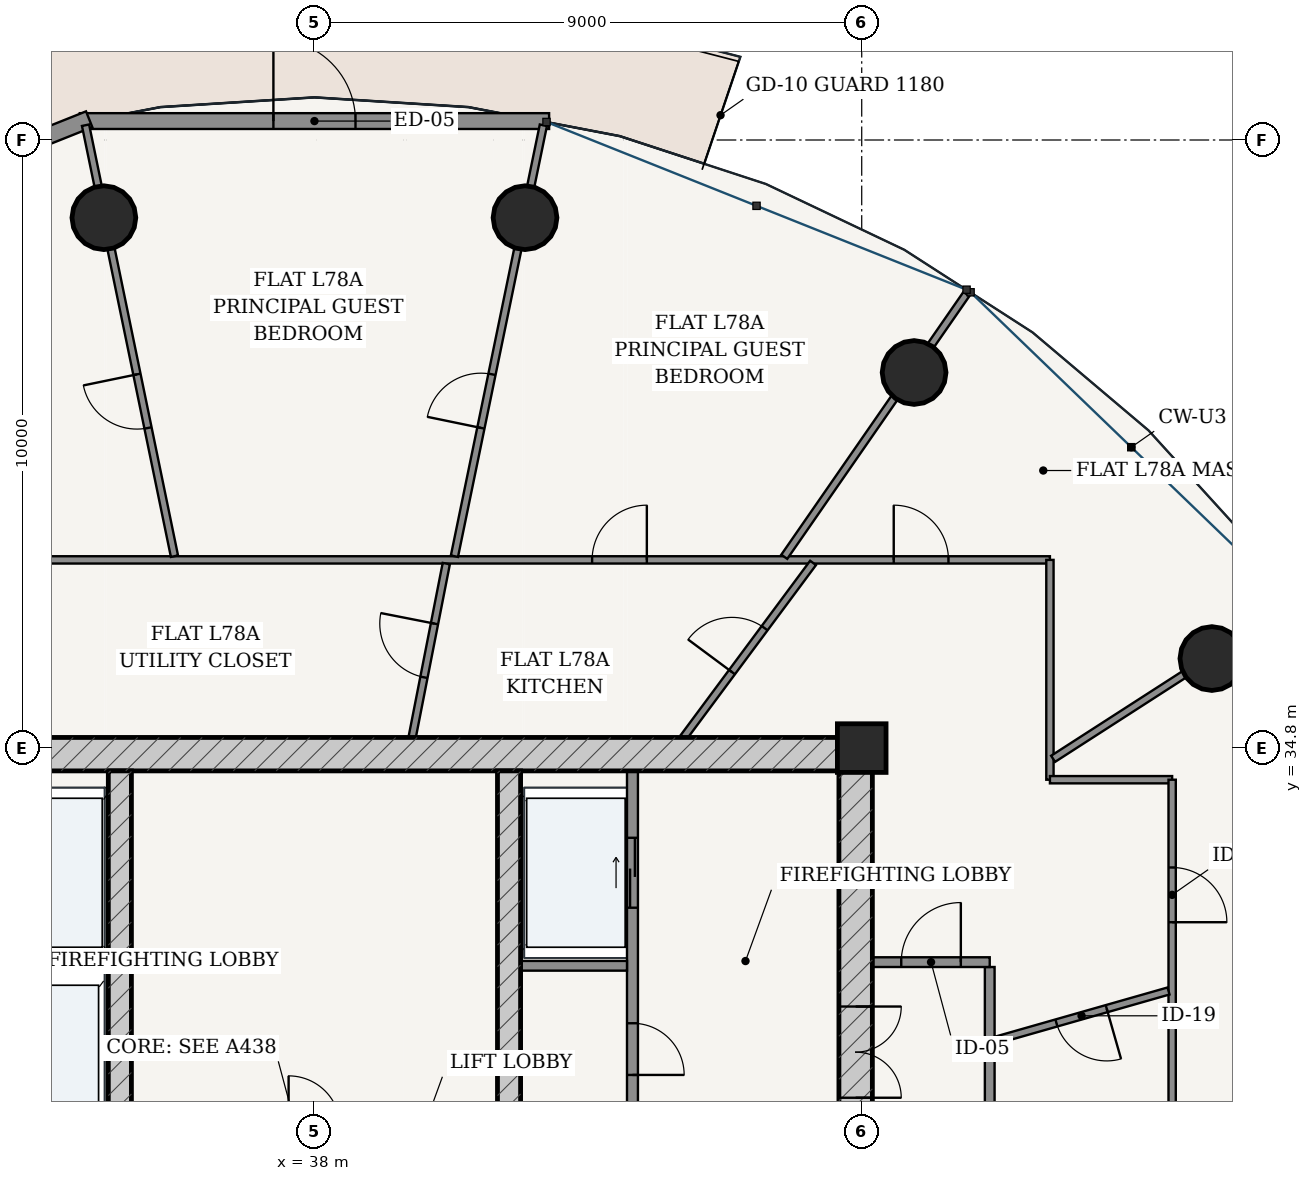
"""IFC4 building model, lengths in metres.
Left out: names, types, materials, properties, quantities, classifications, styles, units other than length and angle.
Written with IfcOpenShell. Run it as: python <this file> out.ifc"""

import sys

from ifc_helpers import new_model, si_unit, direction, frame, frame_2d, origin, origin_2d, place, context, subcontext, project, spatial, rectangle, hollow_circle, extrude, source, transform, mapped, element, fill, save


model = new_model("IFC4")
c1 = context("Model", 3, precision=1e-05, world=origin(), true_north=direction((-0.2419218956, 0.970295726276)))
c2 = subcontext(c1, "Body", "Model", "MODEL_VIEW")
j1 = project(units=[si_unit("LENGTHUNIT", "METRE"), si_unit("PLANEANGLEUNIT", "RADIAN")], contexts=[c1])
p1 = place(None, origin())
s1 = spatial("IfcSite", under=j1, at=p1, CompositionType="ELEMENT")
p2 = place(p1, origin())
s2 = spatial("IfcBuilding", under=s1, at=p2, CompositionType="ELEMENT")
p3 = place(p2, frame((0.0, 0.0, 296.95)))
s3 = spatial("IfcBuildingStorey", under=s2, at=p3, CompositionType="ELEMENT", Elevation=296.95)
p4 = place(p3, frame((47.0, 34.8, 0.0), z_axis=(0.0, 0.0, 1.0), x_axis=(1.0, 0.0, 0.0)))
e1 = element("IfcColumn", 1, at=p4, inside=s3, PredefinedType="COLUMN", context=c2, shape_type="SweptSolid", body=[
    extrude(rectangle(XDim=0.8, YDim=0.8, at=origin_2d()), origin(), (0.0, 0.0, 1.0), 3.75),
])
p5 = place(p3, frame((28.825, 34.7, 0.0), z_axis=(0.0, 0.0, 1.0), x_axis=(1.0, 0.0, 0.0)))
e2 = element("IfcWall", 2, at=p5, inside=s3, PredefinedType="SHEAR", context=c2, shape_type="SweptSolid", body=[
    extrude(rectangle(XDim=18.35, YDim=0.55, at=frame_2d((9.175, 0.0))), origin(), (0.0, 0.0, 1.0), 3.3),
])
p6 = place(p3, frame((46.9, 19.175, 0.0), z_axis=(0.0, 0.0, 1.0), x_axis=(0.0, 1.0, 0.0)))
e3 = element("IfcWall", 3, at=p6, inside=s3, PredefinedType="SHEAR", context=c2, shape_type="SweptSolid", body=[
    extrude(rectangle(XDim=15.25, YDim=0.55, at=frame_2d((7.625, 0.0))), origin(), (0.0, 0.0, 1.0), 3.3),
])
p7 = place(p6, frame((9.875, 0.0, 0.0)))
e4 = element("IfcOpeningElement", 4, at=p7, cuts=e3, PredefinedType="OPENING", context=c2, shape_type="SweptSolid", body=[
    extrude(rectangle(XDim=1.5, YDim=2.2, at=frame_2d((0.75, 1.1))), frame((0.0, 0.285, 0.0), z_axis=(0.0, -1.0, 0.0), x_axis=(1.0, 0.0, 0.0)), (0.0, 0.0, 1.0), 0.57),
])
p8 = place(p3, frame((34.8, 19.175, 0.0), z_axis=(0.0, 0.0, 1.0), x_axis=(0.0, 1.0, 0.0)))
e5 = element("IfcWall", 5, at=p8, inside=s3, PredefinedType="SHEAR", context=c2, shape_type="SweptSolid", body=[
    extrude(rectangle(XDim=15.25, YDim=0.38, at=frame_2d((7.625, 0.0))), origin(), (0.0, 0.0, 1.0), 3.3),
])
p9 = place(p8, frame((7.8, 0.0, 0.0)))
e6 = element("IfcOpeningElement", 6, at=p9, cuts=e5, PredefinedType="OPENING", context=c2, shape_type="SweptSolid", body=[
    extrude(rectangle(XDim=1.05, YDim=2.15, at=frame_2d((0.525, 1.075))), frame((0.0, 0.2, 0.0), z_axis=(0.0, -1.0, 0.0), x_axis=(1.0, 0.0, 0.0)), (0.0, 0.0, 1.0), 0.4),
])
p10 = place(p3, frame((41.2, 19.175, 0.0), z_axis=(0.0, 0.0, 1.0), x_axis=(0.0, 1.0, 0.0)))
e7 = element("IfcWall", 7, at=p10, inside=s3, PredefinedType="SHEAR", context=c2, shape_type="SweptSolid", body=[
    extrude(rectangle(XDim=15.25, YDim=0.38, at=frame_2d((7.625, 0.0))), origin(), (0.0, 0.0, 1.0), 3.3),
])
p11 = place(p10, frame((7.8, 0.0, 0.0)))
e8 = element("IfcOpeningElement", 8, at=p11, cuts=e7, PredefinedType="OPENING", context=c2, shape_type="SweptSolid", body=[
    extrude(rectangle(XDim=1.05, YDim=2.15, at=frame_2d((0.525, 1.075))), frame((0.0, 0.2, 0.0), z_axis=(0.0, -1.0, 0.0), x_axis=(1.0, 0.0, 0.0)), (0.0, 0.0, 1.0), 0.4),
])
for number, where, z_axis, x_axis in (
    (9, (52.759, 36.272, 0.0), (0.0, 0.0, 1.0), (1.0, 0.0, 0.0)),
    (10, (47.861, 40.977, 0.0), (0.0, 0.0, 1.0), (1.0, 0.0, 0.0)),
    (11, (41.463, 43.522, 0.0), (0.0, 0.0, 1.0), (1.0, 0.0, 0.0)),
    (12, (34.537, 43.522, 0.0), (0.0, 0.0, 1.0), (1.0, 0.0, 0.0)),
):
    element("IfcColumn", number, at=place(p3, frame(where, z_axis=z_axis, x_axis=x_axis)), inside=s3, PredefinedType="COLUMN", context=c2, shape_type="SweptSolid", body=[
        extrude(hollow_circle(Radius=0.525, WallThickness=0.035, at=origin_2d()), origin(), (0.0, 0.0, 1.0), 3.75),
    ])
p12 = place(p3, frame((41.859, 45.111, 0.0), z_axis=(0.0, 0.0, 1.0), x_axis=(-1.0, 0.0, 0.0)))
e13 = element("IfcWall", 13, at=p12, inside=s3, PredefinedType="SOLIDWALL", context=c2, shape_type="SweptSolid", body=[
    extrude(rectangle(XDim=7.718, YDim=0.26, at=frame_2d((3.859, 0.0))), origin(), (0.0, 0.0, 1.0), 3.3),
])
p13 = place(p12, frame((3.184, 0.0, 0.0)))
e14 = element("IfcOpeningElement", 14, at=p13, cuts=e13, PredefinedType="OPENING", context=c2, shape_type="SweptSolid", body=[
    extrude(rectangle(XDim=1.35, YDim=2.2, at=frame_2d((0.675, 1.1))), frame((0.0, 0.14, 0.0), z_axis=(0.0, -1.0, 0.0), x_axis=(1.0, 0.0, 0.0)), (0.0, 0.0, 1.0), 0.28),
])
p14 = place(p3, frame((34.295, 45.141, 0.0), z_axis=(0.0, 0.0, 1.0), x_axis=(-0.928724272392, -0.370771123296, 0.0)))
e15 = element("IfcWall", 15, at=p14, inside=s3, PredefinedType="SOLIDWALL", context=c2, shape_type="SweptSolid", body=[
    extrude(rectangle(XDim=7.678, YDim=0.28, at=frame_2d((3.839, 0.0))), origin(), (0.0, 0.0, 1.0), 3.3),
])
p15 = place(p14, frame((1.298, 0.0, 0.85)))
e16 = element("IfcOpeningElement", 16, at=p15, cuts=e15, PredefinedType="OPENING", context=c2, shape_type="SweptSolid", body=[
    extrude(rectangle(XDim=1.55, YDim=1.95, at=frame_2d((0.775, 0.975))), frame((0.0, 0.15, 0.0), z_axis=(0.0, -1.0, 0.0), x_axis=(1.0, 0.0, 0.0)), (0.0, 0.0, 1.0), 0.3),
])
p16 = place(p14, frame((4.83, 0.0, 0.85)))
e17 = element("IfcOpeningElement", 17, at=p16, cuts=e15, PredefinedType="OPENING", context=c2, shape_type="SweptSolid", body=[
    extrude(rectangle(XDim=1.55, YDim=1.95, at=frame_2d((0.775, 0.975))), frame((0.0, 0.15, 0.0), z_axis=(0.0, -1.0, 0.0), x_axis=(1.0, 0.0, 0.0)), (0.0, 0.0, 1.0), 0.3),
])
p17 = place(p3, frame((32.86, 31.22, 0.0), z_axis=(0.0, 0.0, 1.0), x_axis=(1.0, 0.0, 0.0)))
e18 = element("IfcWall", 18, at=p17, inside=s3, PredefinedType="PARTITIONING", context=c2, shape_type="SweptSolid", body=[
    extrude(rectangle(XDim=1.75, YDim=0.16, at=frame_2d((0.875, 0.0))), origin(), (0.0, 0.0, 1.0), 3.3),
])
p18 = place(p3, frame((43.23, 28.52, 0.0), z_axis=(0.0, 0.0, 1.0), x_axis=(0.0, 1.0, 0.0)))
e19 = element("IfcWall", 19, at=p18, inside=s3, PredefinedType="PARTITIONING", context=c2, shape_type="SweptSolid", body=[
    extrude(rectangle(XDim=5.905, YDim=0.18, at=frame_2d((2.953, 0.0))), origin(), (0.0, 0.0, 1.0), 3.3),
])
p19 = place(p18, frame((0.905, 0.0, 0.0)))
e20 = element("IfcOpeningElement", 20, at=p19, cuts=e19, PredefinedType="OPENING", context=c2, shape_type="SweptSolid", body=[
    extrude(rectangle(XDim=0.85, YDim=2.1, at=frame_2d((0.425, 1.05))), frame((0.0, 0.1, 0.0), z_axis=(0.0, -1.0, 0.0), x_axis=(1.0, 0.0, 0.0)), (0.0, 0.0, 1.0), 0.2),
])
p20 = place(p18, frame((3.655, 0.0, 0.0)))
e21 = element("IfcOpeningElement", 21, at=p20, cuts=e19, PredefinedType="OPENING", context=c2, shape_type="SweptSolid", body=[
    extrude(rectangle(XDim=1.15, YDim=2.2, at=frame_2d((0.575, 1.1))), frame((0.0, 0.1, 0.0), z_axis=(0.0, -1.0, 0.0), x_axis=(1.0, 0.0, 0.0)), (0.0, 0.0, 1.0), 0.2),
])
p21 = place(p3, frame((41.39, 31.22, 0.0), z_axis=(0.0, 0.0, 1.0), x_axis=(1.0, 0.0, 0.0)))
e22 = element("IfcWall", 22, at=p21, inside=s3, PredefinedType="PARTITIONING", context=c2, shape_type="SweptSolid", body=[
    extrude(rectangle(XDim=1.75, YDim=0.16, at=frame_2d((0.875, 0.0))), origin(), (0.0, 0.0, 1.0), 3.3),
])
p22 = place(p3, frame((49.105, 17.275, 0.0), z_axis=(0.0, 0.0, 1.0), x_axis=(0.0, 1.0, 0.0)))
e23 = element("IfcWall", 23, at=p22, inside=s3, PredefinedType="PARTITIONING", context=c2, shape_type="SweptSolid", body=[
    extrude(rectangle(XDim=13.925, YDim=0.16, at=frame_2d((6.962, 0.0))), origin(), (0.0, 0.0, 1.0), 2.825),
])
p23 = place(p3, frame((47.175, 31.28, 0.0), z_axis=(0.0, 0.0, 1.0), x_axis=(1.0, 0.0, 0.0)))
e24 = element("IfcWall", 24, at=p23, inside=s3, PredefinedType="PARTITIONING", context=c2, shape_type="SweptSolid", body=[
    extrude(rectangle(XDim=1.93, YDim=0.16, at=frame_2d((0.965, 0.0))), origin(), (0.0, 0.0, 1.0), 3.3),
])
p24 = place(p23, frame((0.475, 0.0, 0.0)))
e25 = element("IfcOpeningElement", 25, at=p24, cuts=e24, PredefinedType="OPENING", context=c2, shape_type="SweptSolid", body=[
    extrude(rectangle(XDim=0.98, YDim=2.2, at=frame_2d((0.49, 1.1))), frame((0.0, 0.09, 0.0), z_axis=(0.0, -1.0, 0.0), x_axis=(1.0, 0.0, 0.0)), (0.0, 0.0, 1.0), 0.18),
])
p25 = place(p3, frame((25.905, 37.895, 0.0), z_axis=(0.0, 0.0, 1.0), x_axis=(1.0, 0.0, 0.0)))
e26 = element("IfcWall", 26, at=p25, inside=s3, PredefinedType="PARTITIONING", context=c2, shape_type="SweptSolid", body=[
    extrude(rectangle(XDim=24.19, YDim=0.12, at=frame_2d((12.095, 0.0))), origin(), (0.0, 0.0, 1.0), 2.825),
])
p26 = place(p25, frame((21.621, 0.0, 0.0)))
e27 = element("IfcOpeningElement", 27, at=p26, cuts=e26, PredefinedType="OPENING", context=c2, shape_type="SweptSolid", body=[
    extrude(rectangle(XDim=0.9, YDim=2.15, at=frame_2d((0.45, 1.075))), frame((0.0, 0.07, 0.0), z_axis=(0.0, -1.0, 0.0), x_axis=(1.0, 0.0, 0.0)), (0.0, 0.0, 1.0), 0.14),
])
p27 = place(p25, frame((16.661, 0.0, 0.0)))
e28 = element("IfcOpeningElement", 28, at=p27, cuts=e26, PredefinedType="OPENING", context=c2, shape_type="SweptSolid", body=[
    extrude(rectangle(XDim=0.9, YDim=2.15, at=frame_2d((0.45, 1.075))), frame((0.0, 0.07, 0.0), z_axis=(0.0, -1.0, 0.0), x_axis=(1.0, 0.0, 0.0)), (0.0, 0.0, 1.0), 0.14),
])
p28 = place(p25, frame((1.872, 0.0, 0.0)))
e29 = element("IfcOpeningElement", 29, at=p28, cuts=e26, PredefinedType="OPENING", context=c2, shape_type="SweptSolid", body=[
    extrude(rectangle(XDim=0.9, YDim=2.15, at=frame_2d((0.45, 1.075))), frame((0.0, 0.07, 0.0), z_axis=(0.0, -1.0, 0.0), x_axis=(1.0, 0.0, 0.0)), (0.0, 0.0, 1.0), 0.14),
])
p29 = place(p3, frame((50.095, 37.895, 0.0), z_axis=(0.0, 0.0, 1.0), x_axis=(0.0, -1.0, 0.0)))
e30 = element("IfcWall", 30, at=p29, inside=s3, PredefinedType="PARTITIONING", context=c2, shape_type="SweptSolid", body=[
    extrude(rectangle(XDim=3.615, YDim=0.12, at=frame_2d((1.808, 0.0))), origin(), (0.0, 0.0, 1.0), 2.825),
])
p30 = place(p3, frame((50.095, 34.28, 0.0), z_axis=(0.0, 0.0, 1.0), x_axis=(1.0, 0.0, 0.0)))
e31 = element("IfcWall", 31, at=p30, inside=s3, PredefinedType="PARTITIONING", context=c2, shape_type="SweptSolid", body=[
    extrude(rectangle(XDim=2.01, YDim=0.12, at=frame_2d((1.005, 0.0))), origin(), (0.0, 0.0, 1.0), 3.3),
])
p31 = place(p3, frame((52.105, 34.28, 0.0), z_axis=(0.0, 0.0, 1.0), x_axis=(0.0, -1.0, 0.0)))
e32 = element("IfcWall", 32, at=p31, inside=s3, PredefinedType="PARTITIONING", context=c2, shape_type="SweptSolid", body=[
    extrude(rectangle(XDim=10.083, YDim=0.12, at=frame_2d((5.041, 0.0))), origin(), (0.0, 0.0, 1.0), 2.825),
])
p32 = place(p31, frame((1.444, 0.0, 0.0)))
e33 = element("IfcOpeningElement", 33, at=p32, cuts=e32, PredefinedType="OPENING", context=c2, shape_type="SweptSolid", body=[
    extrude(rectangle(XDim=0.9, YDim=2.15, at=frame_2d((0.45, 1.075))), frame((0.0, 0.07, 0.0), z_axis=(0.0, -1.0, 0.0), x_axis=(1.0, 0.0, 0.0)), (0.0, 0.0, 1.0), 0.14),
])
p33 = place(p3, frame((50.147, 34.624, 0.0), z_axis=(0.0, 0.0, 1.0), x_axis=(0.840694066929, 0.541510374628, 0.0)))
e34 = element("IfcWall", 34, at=p33, inside=s3, PredefinedType="PARTITIONING", context=c2, shape_type="SweptSolid", body=[
    extrude(rectangle(XDim=4.637, YDim=0.12, at=frame_2d((2.319, 0.0))), origin(), (0.0, 0.0, 1.0), 2.65),
])
p34 = place(p3, frame((45.726, 37.946, 0.0), z_axis=(0.0, 0.0, 1.0), x_axis=(0.569678410446, 0.821867695357, 0.0)))
e35 = element("IfcWall", 35, at=p34, inside=s3, PredefinedType="PARTITIONING", context=c2, shape_type="SweptSolid", body=[
    extrude(rectangle(XDim=5.257, YDim=0.12, at=frame_2d((2.628, 0.0))), origin(), (0.0, 0.0, 1.0), 2.65),
])
p35 = place(p3, frame((40.302, 37.956, 0.0), z_axis=(0.0, 0.0, 1.0), x_axis=(0.20211361456, 0.979362081566, 0.0)))
e36 = element("IfcWall", 36, at=p35, inside=s3, PredefinedType="PARTITIONING", context=c2, shape_type="SweptSolid", body=[
    extrude(rectangle(XDim=7.237, YDim=0.12, at=frame_2d((3.618, 0.0))), origin(), (0.0, 0.0, 1.0), 2.65),
])
p36 = place(p35, frame((2.154, 0.0, 0.0)))
e37 = element("IfcOpeningElement", 37, at=p36, cuts=e36, PredefinedType="OPENING", context=c2, shape_type="SweptSolid", body=[
    extrude(rectangle(XDim=0.9, YDim=2.15, at=frame_2d((0.45, 1.075))), frame((0.0, 0.07, 0.0), z_axis=(0.0, -1.0, 0.0), x_axis=(1.0, 0.0, 0.0)), (0.0, 0.0, 1.0), 0.14),
])
p37 = place(p3, frame((35.698, 37.956, 0.0), z_axis=(0.0, 0.0, 1.0), x_axis=(-0.20211361456, 0.979362081566, 0.0)))
e38 = element("IfcWall", 38, at=p37, inside=s3, PredefinedType="PARTITIONING", context=c2, shape_type="SweptSolid", body=[
    extrude(rectangle(XDim=7.237, YDim=0.12, at=frame_2d((3.618, 0.0))), origin(), (0.0, 0.0, 1.0), 2.65),
])
p38 = place(p37, frame((2.153, 0.0, 0.0)))
e39 = element("IfcOpeningElement", 39, at=p38, cuts=e38, PredefinedType="OPENING", context=c2, shape_type="SweptSolid", body=[
    extrude(rectangle(XDim=0.9, YDim=2.15, at=frame_2d((0.45, 1.075))), frame((0.0, 0.07, 0.0), z_axis=(0.0, -1.0, 0.0), x_axis=(1.0, 0.0, 0.0)), (0.0, 0.0, 1.0), 0.14),
])
p39 = place(p3, frame((49.185, 29.99, 0.0), z_axis=(0.0, 0.0, 1.0), x_axis=(0.961663207035, 0.274233251511, 0.0)))
e40 = element("IfcWall", 40, at=p39, inside=s3, PredefinedType="PARTITIONING", context=c2, shape_type="SweptSolid", body=[
    extrude(rectangle(XDim=2.974, YDim=0.12, at=frame_2d((1.487, 0.0))), origin(), (0.0, 0.0, 1.0), 3.019),
])
p40 = place(p39, frame((1.057, 0.0, 0.0)))
e41 = element("IfcOpeningElement", 41, at=p40, cuts=e40, PredefinedType="OPENING", context=c2, shape_type="SweptSolid", body=[
    extrude(rectangle(XDim=0.86, YDim=2.15, at=frame_2d((0.43, 1.075))), frame((0.0, 0.07, 0.0), z_axis=(0.0, -1.0, 0.0), x_axis=(1.0, 0.0, 0.0)), (0.0, 0.0, 1.0), 0.14),
])
p41 = place(p3, frame((44.07, 34.977, 0.0), z_axis=(0.0, 0.0, 1.0), x_axis=(0.596034582173, 0.802958764106, 0.0)))
e42 = element("IfcWall", 42, at=p41, inside=s3, PredefinedType="PARTITIONING", context=c2, shape_type="SweptSolid", body=[
    extrude(rectangle(XDim=3.573, YDim=0.12, at=frame_2d((1.786, 0.0))), origin(), (0.0, 0.0, 1.0), 3.019),
])
p42 = place(p41, frame((1.336, 0.0, 0.0)))
e43 = element("IfcOpeningElement", 43, at=p42, cuts=e42, PredefinedType="OPENING", context=c2, shape_type="SweptSolid", body=[
    extrude(rectangle(XDim=0.9, YDim=2.15, at=frame_2d((0.45, 1.075))), frame((0.0, 0.07, 0.0), z_axis=(0.0, -1.0, 0.0), x_axis=(1.0, 0.0, 0.0)), (0.0, 0.0, 1.0), 0.14),
])
p43 = place(p3, frame((39.607, 34.977, 0.0), z_axis=(0.0, 0.0, 1.0), x_axis=(0.192841890083, 0.981229843324, 0.0)))
e44 = element("IfcWall", 44, at=p43, inside=s3, PredefinedType="PARTITIONING", context=c2, shape_type="SweptSolid", body=[
    extrude(rectangle(XDim=2.912, YDim=0.12, at=frame_2d((1.456, 0.0))), origin(), (0.0, 0.0, 1.0), 2.385),
])
p44 = place(p43, frame((1.006, 0.0, 0.0)))
e45 = element("IfcOpeningElement", 45, at=p44, cuts=e44, PredefinedType="OPENING", context=c2, shape_type="SweptSolid", body=[
    extrude(rectangle(XDim=0.9, YDim=2.15, at=frame_2d((0.45, 1.075))), frame((0.0, 0.07, 0.0), z_axis=(0.0, -1.0, 0.0), x_axis=(1.0, 0.0, 0.0)), (0.0, 0.0, 1.0), 0.14),
])
m1 = source(origin(), c2, "Body", "SweptSolid", [
    extrude(rectangle(XDim=1.35, YDim=2.2, at=frame_2d((0.675, 1.1))), frame((0.0, 0.025, 0.0), z_axis=(0.0, -1.0, 0.0), x_axis=(1.0, 0.0, 0.0)), (0.0, 0.0, 1.0), 0.05),
])
p45 = place(p13, frame((1.35, 0.0, 0.0), z_axis=(0.0, 0.0, 1.0), x_axis=(-1.0, 0.0, 0.0)))
e46 = element("IfcDoor", 46, at=p45, inside=s3, OperationType="SINGLE_SWING_LEFT", PredefinedType="DOOR", context=c2, shape_type="MappedRepresentation", body=[
    mapped(m1, transform((0.0, 0.0, 0.0), scale=1.0)),
])
fill(e14, e46)
m2 = source(origin(), c2, "Body", "SweptSolid", [
    extrude(rectangle(XDim=1.5, YDim=2.2, at=frame_2d((0.75, 1.1))), frame((0.0, 0.025, 0.0), z_axis=(0.0, -1.0, 0.0), x_axis=(1.0, 0.0, 0.0)), (0.0, 0.0, 1.0), 0.05),
])
p46 = place(p7, frame((1.5, 0.0, 0.0), z_axis=(0.0, 0.0, 1.0), x_axis=(-1.0, 0.0, 0.0)))
e47 = element("IfcDoor", 47, at=p46, inside=s3, OperationType="DOUBLE_DOOR_SINGLE_SWING", PredefinedType="DOOR", context=c2, shape_type="MappedRepresentation", body=[
    mapped(m2, transform((0.0, 0.0, 0.0), scale=1.0)),
])
fill(e4, e47)
m3 = source(origin(), c2, "Body", "SweptSolid", [
    extrude(rectangle(XDim=0.85, YDim=2.1, at=frame_2d((0.425, 1.05))), frame((0.0, 0.025, 0.0), z_axis=(0.0, -1.0, 0.0), x_axis=(1.0, 0.0, 0.0)), (0.0, 0.0, 1.0), 0.05),
])
p47 = place(p19, frame((0.85, 0.0, 0.0), z_axis=(0.0, 0.0, 1.0), x_axis=(-1.0, 0.0, 0.0)))
e48 = element("IfcDoor", 48, at=p47, inside=s3, OperationType="SINGLE_SWING_RIGHT", PredefinedType="DOOR", context=c2, shape_type="MappedRepresentation", body=[
    mapped(m3, transform((0.0, 0.0, 0.0), scale=1.0)),
])
fill(e20, e48)
m4 = source(origin(), c2, "Body", "SweptSolid", [
    extrude(rectangle(XDim=1.15, YDim=2.2, at=frame_2d((0.575, 1.1))), frame((0.0, 0.025, 0.0), z_axis=(0.0, -1.0, 0.0), x_axis=(1.0, 0.0, 0.0)), (0.0, 0.0, 1.0), 0.05),
])
p48 = place(p20, origin())
e49 = element("IfcDoor", 49, at=p48, inside=s3, OperationType="DOUBLE_DOOR_SLIDING", PredefinedType="DOOR", context=c2, shape_type="MappedRepresentation", body=[
    mapped(m4, transform((0.0, 0.0, 0.0), scale=1.0)),
])
fill(e21, e49)
m5 = source(origin(), c2, "Body", "SweptSolid", [
    extrude(rectangle(XDim=0.98, YDim=2.2, at=frame_2d((0.49, 1.1))), frame((0.0, 0.025, 0.0), z_axis=(0.0, -1.0, 0.0), x_axis=(1.0, 0.0, 0.0)), (0.0, 0.0, 1.0), 0.05),
])
p49 = place(p24, origin())
e50 = element("IfcDoor", 50, at=p49, inside=s3, OperationType="SINGLE_SWING_RIGHT", PredefinedType="DOOR", context=c2, shape_type="MappedRepresentation", body=[
    mapped(m5, transform((0.0, 0.0, 0.0), scale=1.0)),
])
fill(e25, e50)
m6 = source(origin(), c2, "Body", "SweptSolid", [
    extrude(rectangle(XDim=0.86, YDim=2.15, at=frame_2d((0.43, 1.075))), frame((0.0, 0.025, 0.0), z_axis=(0.0, -1.0, 0.0), x_axis=(1.0, 0.0, 0.0)), (0.0, 0.0, 1.0), 0.05),
])
p50 = place(p40, frame((0.86, 0.0, 0.0), z_axis=(0.0, 0.0, 1.0), x_axis=(-1.0, 0.0, 0.0)))
e51 = element("IfcDoor", 51, at=p50, inside=s3, OperationType="SINGLE_SWING_LEFT", PredefinedType="DOOR", context=c2, shape_type="MappedRepresentation", body=[
    mapped(m6, transform((0.0, 0.0, 0.0), scale=1.0)),
])
fill(e41, e51)
m7 = source(origin(), c2, "Body", "SweptSolid", [
    extrude(rectangle(XDim=0.9, YDim=2.15, at=frame_2d((0.45, 1.075))), frame((0.0, 0.025, 0.0), z_axis=(0.0, -1.0, 0.0), x_axis=(1.0, 0.0, 0.0)), (0.0, 0.0, 1.0), 0.05),
])
p51 = place(p32, origin())
e52 = element("IfcDoor", 52, at=p51, inside=s3, OperationType="SINGLE_SWING_RIGHT", PredefinedType="DOOR", context=c2, shape_type="MappedRepresentation", body=[
    mapped(m7, transform((0.0, 0.0, 0.0), scale=1.0)),
])
fill(e33, e52)
p52 = place(p42, origin())
e53 = element("IfcDoor", 53, at=p52, inside=s3, OperationType="SINGLE_SWING_LEFT", PredefinedType="DOOR", context=c2, shape_type="MappedRepresentation", body=[
    mapped(m7, transform((0.0, 0.0, 0.0), scale=1.0)),
])
fill(e43, e53)
p53 = place(p44, origin())
e54 = element("IfcDoor", 54, at=p53, inside=s3, OperationType="SINGLE_SWING_RIGHT", PredefinedType="DOOR", context=c2, shape_type="MappedRepresentation", body=[
    mapped(m7, transform((0.0, 0.0, 0.0), scale=1.0)),
])
fill(e45, e54)
p54 = place(p26, origin())
e55 = element("IfcDoor", 55, at=p54, inside=s3, OperationType="SINGLE_SWING_LEFT", PredefinedType="DOOR", context=c2, shape_type="MappedRepresentation", body=[
    mapped(m7, transform((0.0, 0.0, 0.0), scale=1.0)),
])
fill(e27, e55)
p55 = place(p27, origin())
e56 = element("IfcDoor", 56, at=p55, inside=s3, OperationType="SINGLE_SWING_RIGHT", PredefinedType="DOOR", context=c2, shape_type="MappedRepresentation", body=[
    mapped(m7, transform((0.0, 0.0, 0.0), scale=1.0)),
])
fill(e28, e56)
p56 = place(p36, origin())
e57 = element("IfcDoor", 57, at=p56, inside=s3, OperationType="SINGLE_SWING_LEFT", PredefinedType="DOOR", context=c2, shape_type="MappedRepresentation", body=[
    mapped(m7, transform((0.0, 0.0, 0.0), scale=1.0)),
])
fill(e37, e57)
p57 = place(p38, origin())
e58 = element("IfcDoor", 58, at=p57, inside=s3, OperationType="SINGLE_SWING_RIGHT", PredefinedType="DOOR", context=c2, shape_type="MappedRepresentation", body=[
    mapped(m7, transform((0.0, 0.0, 0.0), scale=1.0)),
])
fill(e39, e58)
save(model, sys.argv[1])
